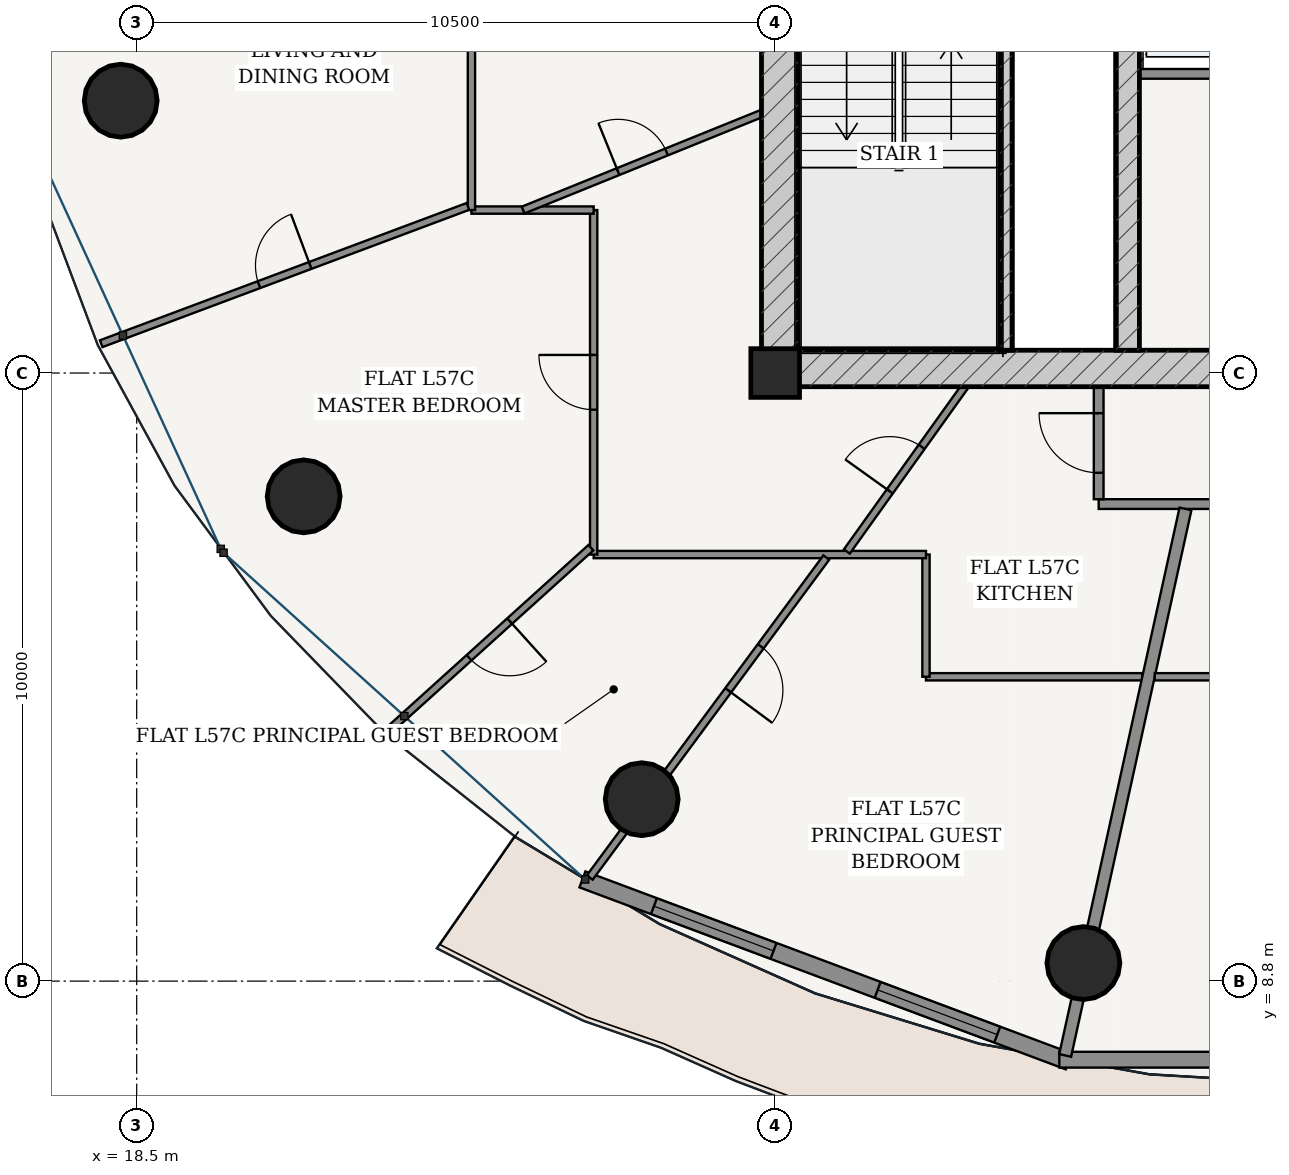
"""IFC4 building model, lengths in metres.
Left out: names, types, materials, properties, quantities, classifications, styles, units other than length and angle.
Written with IfcOpenShell. Run it as: python <this file> out.ifc"""

import sys

from ifc_helpers import new_model, si_unit, direction, frame, frame_2d, origin, origin_2d, place, context, subcontext, project, spatial, rectangle, hollow_circle, extrude, source, transform, mapped, element, fill, save


model = new_model("IFC4")
c1 = context("Model", 3, precision=1e-05, world=origin(), true_north=direction((-0.2419218956, 0.970295726276)))
c2 = subcontext(c1, "Body", "Model", "MODEL_VIEW")
j1 = project(units=[si_unit("LENGTHUNIT", "METRE"), si_unit("PLANEANGLEUNIT", "RADIAN")], contexts=[c1])
p1 = place(None, origin())
s1 = spatial("IfcSite", under=j1, at=p1, CompositionType="ELEMENT")
p2 = place(p1, origin())
s2 = spatial("IfcBuilding", under=s1, at=p2, CompositionType="ELEMENT")
p3 = place(p2, frame((0.0, 0.0, 217.1)))
s3 = spatial("IfcBuildingStorey", under=s2, at=p3, CompositionType="ELEMENT", Elevation=217.1)
p4 = place(p3, frame((29.0, 18.8, 0.0), z_axis=(0.0, 0.0, 1.0), x_axis=(1.0, 0.0, 0.0)))
e1 = element("IfcColumn", 1, at=p4, inside=s3, PredefinedType="COLUMN", context=c2, shape_type="SweptSolid", body=[
    extrude(rectangle(XDim=0.8, YDim=0.8, at=origin_2d()), origin(), (0.0, 0.0, 1.0), 3.7),
])
p5 = place(p3, frame((28.775, 18.875, 0.0), z_axis=(0.0, 0.0, 1.0), x_axis=(1.0, 0.0, 0.0)))
e2 = element("IfcWall", 2, at=p5, inside=s3, PredefinedType="SHEAR", context=c2, shape_type="SweptSolid", body=[
    extrude(rectangle(XDim=18.45, YDim=0.6, at=frame_2d((9.225, 0.0))), origin(), (0.0, 0.0, 1.0), 3.435),
])
p6 = place(p5, frame((7.46, 0.0, 0.0)))
e3 = element("IfcOpeningElement", 3, at=p6, cuts=e2, PredefinedType="OPENING", context=c2, shape_type="SweptSolid", body=[
    extrude(rectangle(XDim=0.85, YDim=2.1, at=frame_2d((0.425, 1.05))), frame((0.0, 0.31, 0.0), z_axis=(0.0, -1.0, 0.0), x_axis=(1.0, 0.0, 0.0)), (0.0, 0.0, 1.0), 0.62),
])
p7 = place(p5, frame((10.54, 0.0, 0.0)))
e4 = element("IfcOpeningElement", 4, at=p7, cuts=e2, PredefinedType="OPENING", context=c2, shape_type="SweptSolid", body=[
    extrude(rectangle(XDim=0.85, YDim=2.1, at=frame_2d((0.425, 1.05))), frame((0.0, 0.31, 0.0), z_axis=(0.0, -1.0, 0.0), x_axis=(1.0, 0.0, 0.0)), (0.0, 0.0, 1.0), 0.62),
])
p8 = place(p3, frame((29.075, 19.175, 0.0), z_axis=(0.0, 0.0, 1.0), x_axis=(0.0, 1.0, 0.0)))
e5 = element("IfcWall", 5, at=p8, inside=s3, PredefinedType="SHEAR", context=c2, shape_type="SweptSolid", body=[
    extrude(rectangle(XDim=15.25, YDim=0.6, at=frame_2d((7.625, 0.0))), origin(), (0.0, 0.0, 1.0), 3.435),
])
p9 = place(p8, frame((9.875, 0.0, 0.0)))
e6 = element("IfcOpeningElement", 6, at=p9, cuts=e5, PredefinedType="OPENING", context=c2, shape_type="SweptSolid", body=[
    extrude(rectangle(XDim=1.5, YDim=2.2, at=frame_2d((0.75, 1.1))), frame((0.0, 0.31, 0.0), z_axis=(0.0, -1.0, 0.0), x_axis=(1.0, 0.0, 0.0)), (0.0, 0.0, 1.0), 0.62),
])
p10 = place(p3, frame((32.795, 19.175, 0.0), z_axis=(0.0, 0.0, 1.0), x_axis=(0.0, 1.0, 0.0)))
e7 = element("IfcWall", 7, at=p10, inside=s3, PredefinedType="SOLIDWALL", context=c2, shape_type="SweptSolid", body=[
    extrude(rectangle(XDim=7.375, YDim=0.2, at=frame_2d((3.688, 0.0))), origin(), (0.0, 0.0, 1.0), 3.435),
])
p11 = place(p3, frame((34.8, 19.175, 0.0), z_axis=(0.0, 0.0, 1.0), x_axis=(0.0, 1.0, 0.0)))
e8 = element("IfcWall", 8, at=p11, inside=s3, PredefinedType="SHEAR", context=c2, shape_type="SweptSolid", body=[
    extrude(rectangle(XDim=15.25, YDim=0.38, at=frame_2d((7.625, 0.0))), origin(), (0.0, 0.0, 1.0), 3.435),
])
p12 = place(p11, frame((7.8, 0.0, 0.0)))
e9 = element("IfcOpeningElement", 9, at=p12, cuts=e8, PredefinedType="OPENING", context=c2, shape_type="SweptSolid", body=[
    extrude(rectangle(XDim=1.05, YDim=2.15, at=frame_2d((0.525, 1.075))), frame((0.0, 0.2, 0.0), z_axis=(0.0, -1.0, 0.0), x_axis=(1.0, 0.0, 0.0)), (0.0, 0.0, 1.0), 0.4),
])
for number, where, z_axis, x_axis in (
    (10, (18.237, 23.279, 0.0), (0.0, 0.0, 1.0), (1.0, 0.0, 0.0)),
    (11, (21.246, 16.772, 0.0), (0.0, 0.0, 1.0), (1.0, 0.0, 0.0)),
    (12, (26.805, 11.792, 0.0), (0.0, 0.0, 1.0), (1.0, 0.0, 0.0)),
    (13, (34.069, 9.097, 0.0), (0.0, 0.0, 1.0), (1.0, 0.0, 0.0)),
):
    element("IfcColumn", number, at=place(p3, frame(where, z_axis=z_axis, x_axis=x_axis)), inside=s3, PredefinedType="COLUMN", context=c2, shape_type="SweptSolid", body=[
        extrude(hollow_circle(Radius=0.6, WallThickness=0.038, at=origin_2d()), origin(), (0.0, 0.0, 1.0), 3.7),
    ])
p13 = place(p3, frame((25.83, 10.473, 0.0), z_axis=(0.0, 0.0, 1.0), x_axis=(0.936556918375, -0.350515532672, 0.0)))
e14 = element("IfcWall", 14, at=p13, inside=s3, PredefinedType="SOLIDWALL", context=c2, shape_type="SweptSolid", body=[
    extrude(rectangle(XDim=8.539, YDim=0.28, at=frame_2d((4.27, 0.0))), origin(), (0.0, 0.0, 1.0), 3.435),
])
p14 = place(p13, frame((1.256, 0.0, 0.85)))
e15 = element("IfcOpeningElement", 15, at=p14, cuts=e14, PredefinedType="OPENING", context=c2, shape_type="SweptSolid", body=[
    extrude(rectangle(XDim=2.1, YDim=1.95, at=frame_2d((1.05, 0.975))), frame((0.0, 0.15, 0.0), z_axis=(0.0, -1.0, 0.0), x_axis=(1.0, 0.0, 0.0)), (0.0, 0.0, 1.0), 0.3),
])
p15 = place(p13, frame((5.184, 0.0, 0.85)))
e16 = element("IfcOpeningElement", 16, at=p15, cuts=e14, PredefinedType="OPENING", context=c2, shape_type="SweptSolid", body=[
    extrude(rectangle(XDim=2.1, YDim=1.95, at=frame_2d((1.05, 0.975))), frame((0.0, 0.15, 0.0), z_axis=(0.0, -1.0, 0.0), x_axis=(1.0, 0.0, 0.0)), (0.0, 0.0, 1.0), 0.3),
])
p16 = place(p3, frame((33.673, 7.508, 0.0), z_axis=(0.0, 0.0, 1.0), x_axis=(1.0, 0.0, 0.0)))
e17 = element("IfcWall", 17, at=p16, inside=s3, PredefinedType="SOLIDWALL", context=c2, shape_type="SweptSolid", body=[
    extrude(rectangle(XDim=8.654, YDim=0.26, at=frame_2d((4.327, 0.0))), origin(), (0.0, 0.0, 1.0), 3.435),
])
p17 = place(p16, frame((3.652, 0.0, 0.0)))
e18 = element("IfcOpeningElement", 18, at=p17, cuts=e17, PredefinedType="OPENING", context=c2, shape_type="SweptSolid", body=[
    extrude(rectangle(XDim=1.35, YDim=2.2, at=frame_2d((0.675, 1.1))), frame((0.0, 0.14, 0.0), z_axis=(0.0, -1.0, 0.0), x_axis=(1.0, 0.0, 0.0)), (0.0, 0.0, 1.0), 0.28),
])
p18 = place(p3, frame((34.99, 23.72, 0.0), z_axis=(0.0, 0.0, 1.0), x_axis=(1.0, 0.0, 0.0)))
e19 = element("IfcWall", 19, at=p18, inside=s3, PredefinedType="PARTITIONING", context=c2, shape_type="SweptSolid", body=[
    extrude(rectangle(XDim=6.02, YDim=0.16, at=frame_2d((3.01, 0.0))), origin(), (0.0, 0.0, 1.0), 3.435),
])
p19 = place(p3, frame((34.32, 16.645, 0.0), z_axis=(0.0, 0.0, 1.0), x_axis=(1.0, 0.0, 0.0)))
e20 = element("IfcWall", 20, at=p19, inside=s3, PredefinedType="PARTITIONING", context=c2, shape_type="SweptSolid", body=[
    extrude(rectangle(XDim=14.835, YDim=0.16, at=frame_2d((7.417, 0.0))), origin(), (0.0, 0.0, 1.0), 2.951),
])
p20 = place(p19, frame((8.973, 0.0, 0.0)))
e21 = element("IfcOpeningElement", 21, at=p20, cuts=e20, PredefinedType="OPENING", context=c2, shape_type="SweptSolid", body=[
    extrude(rectangle(XDim=0.98, YDim=2.2, at=frame_2d((0.49, 1.1))), frame((0.0, 0.09, 0.0), z_axis=(0.0, -1.0, 0.0), x_axis=(1.0, 0.0, 0.0)), (0.0, 0.0, 1.0), 0.18),
])
p21 = place(p3, frame((34.32, 16.725, 0.0), z_axis=(0.0, 0.0, 1.0), x_axis=(0.0, 1.0, 0.0)))
e22 = element("IfcWall", 22, at=p21, inside=s3, PredefinedType="PARTITIONING", context=c2, shape_type="SweptSolid", body=[
    extrude(rectangle(XDim=1.85, YDim=0.16, at=frame_2d((0.925, 0.0))), origin(), (0.0, 0.0, 1.0), 3.435),
])
p22 = place(p21, frame((0.435, 0.0, 0.0)))
e23 = element("IfcOpeningElement", 23, at=p22, cuts=e22, PredefinedType="OPENING", context=c2, shape_type="SweptSolid", body=[
    extrude(rectangle(XDim=0.98, YDim=2.2, at=frame_2d((0.49, 1.1))), frame((0.0, 0.09, 0.0), z_axis=(0.0, -1.0, 0.0), x_axis=(1.0, 0.0, 0.0)), (0.0, 0.0, 1.0), 0.18),
])
p23 = place(p3, frame((35.038, 13.805, 0.0), z_axis=(0.0, 0.0, 1.0), x_axis=(-1.0, 0.0, 0.0)))
e24 = element("IfcWall", 24, at=p23, inside=s3, PredefinedType="PARTITIONING", context=c2, shape_type="SweptSolid", body=[
    extrude(rectangle(XDim=3.558, YDim=0.12, at=frame_2d((1.779, 0.0))), origin(), (0.0, 0.0, 1.0), 2.951),
])
p24 = place(p3, frame((31.48, 13.805, 0.0), z_axis=(0.0, 0.0, 1.0), x_axis=(0.0, 1.0, 0.0)))
e25 = element("IfcWall", 25, at=p24, inside=s3, PredefinedType="PARTITIONING", context=c2, shape_type="SweptSolid", body=[
    extrude(rectangle(XDim=2.01, YDim=0.12, at=frame_2d((1.005, 0.0))), origin(), (0.0, 0.0, 1.0), 3.11),
])
p25 = place(p3, frame((31.48, 15.815, 0.0), z_axis=(0.0, 0.0, 1.0), x_axis=(-1.0, 0.0, 0.0)))
e26 = element("IfcWall", 26, at=p25, inside=s3, PredefinedType="PARTITIONING", context=c2, shape_type="SweptSolid", body=[
    extrude(rectangle(XDim=5.465, YDim=0.12, at=frame_2d((2.732, 0.0))), origin(), (0.0, 0.0, 1.0), 2.951),
])
p26 = place(p3, frame((26.015, 15.815, 0.0), z_axis=(0.0, 0.0, 1.0), x_axis=(0.0, 1.0, 0.0)))
e27 = element("IfcWall", 27, at=p26, inside=s3, PredefinedType="PARTITIONING", context=c2, shape_type="SweptSolid", body=[
    extrude(rectangle(XDim=5.665, YDim=0.12, at=frame_2d((2.833, 0.0))), origin(), (0.0, 0.0, 1.0), 2.951),
])
p27 = place(p26, frame((2.383, 0.0, 0.0)))
e28 = element("IfcOpeningElement", 28, at=p27, cuts=e27, PredefinedType="OPENING", context=c2, shape_type="SweptSolid", body=[
    extrude(rectangle(XDim=0.9, YDim=2.15, at=frame_2d((0.45, 1.075))), frame((0.0, 0.07, 0.0), z_axis=(0.0, -1.0, 0.0), x_axis=(1.0, 0.0, 0.0)), (0.0, 0.0, 1.0), 0.14),
])
p28 = place(p3, frame((26.015, 21.48, 0.0), z_axis=(0.0, 0.0, 1.0), x_axis=(-1.0, 0.0, 0.0)))
e29 = element("IfcWall", 29, at=p28, inside=s3, PredefinedType="PARTITIONING", context=c2, shape_type="SweptSolid", body=[
    extrude(rectangle(XDim=2.01, YDim=0.12, at=frame_2d((1.005, 0.0))), origin(), (0.0, 0.0, 1.0), 3.11),
])
p29 = place(p3, frame((24.005, 21.48, 0.0), z_axis=(0.0, 0.0, 1.0), x_axis=(0.0, 1.0, 0.0)))
e30 = element("IfcWall", 30, at=p29, inside=s3, PredefinedType="PARTITIONING", context=c2, shape_type="SweptSolid", body=[
    extrude(rectangle(XDim=5.218, YDim=0.12, at=frame_2d((2.609, 0.0))), origin(), (0.0, 0.0, 1.0), 2.951),
])
p30 = place(p3, frame((23.947, 21.54, 0.0), z_axis=(0.0, 0.0, 1.0), x_axis=(-0.936534700322, -0.350574892274, 0.0)))
e31 = element("IfcWall", 31, at=p30, inside=s3, PredefinedType="PARTITIONING", context=c2, shape_type="SweptSolid", body=[
    extrude(rectangle(XDim=6.439, YDim=0.12, at=frame_2d((3.219, 0.0))), origin(), (0.0, 0.0, 1.0), 2.951),
])
p31 = place(p30, frame((2.769, 0.0, 0.0)))
e32 = element("IfcOpeningElement", 32, at=p31, cuts=e31, PredefinedType="OPENING", context=c2, shape_type="SweptSolid", body=[
    extrude(rectangle(XDim=0.9, YDim=2.15, at=frame_2d((0.45, 1.075))), frame((0.0, 0.07, 0.0), z_axis=(0.0, -1.0, 0.0), x_axis=(1.0, 0.0, 0.0)), (0.0, 0.0, 1.0), 0.14),
])
p32 = place(p3, frame((25.969, 15.928, 0.0), z_axis=(0.0, 0.0, 1.0), x_axis=(-0.741935446671, -0.670471321514, 0.0)))
e33 = element("IfcWall", 33, at=p32, inside=s3, PredefinedType="PARTITIONING", context=c2, shape_type="SweptSolid", body=[
    extrude(rectangle(XDim=4.499, YDim=0.12, at=frame_2d((2.25, 0.0))), origin(), (0.0, 0.0, 1.0), 2.951),
])
p33 = place(p32, frame((1.8, 0.0, 0.0)))
e34 = element("IfcOpeningElement", 34, at=p33, cuts=e33, PredefinedType="OPENING", context=c2, shape_type="SweptSolid", body=[
    extrude(rectangle(XDim=0.9, YDim=2.15, at=frame_2d((0.45, 1.075))), frame((0.0, 0.07, 0.0), z_axis=(0.0, -1.0, 0.0), x_axis=(1.0, 0.0, 0.0)), (0.0, 0.0, 1.0), 0.14),
])
p34 = place(p3, frame((29.841, 15.765, 0.0), z_axis=(0.0, 0.0, 1.0), x_axis=(-0.594535821787, -0.804069124275, 0.0)))
e35 = element("IfcWall", 35, at=p34, inside=s3, PredefinedType="PARTITIONING", context=c2, shape_type="SweptSolid", body=[
    extrude(rectangle(XDim=6.543, YDim=0.12, at=frame_2d((3.272, 0.0))), origin(), (0.0, 0.0, 1.0), 2.951),
])
p35 = place(p34, frame((1.814, 0.0, 0.0)))
e36 = element("IfcOpeningElement", 36, at=p35, cuts=e35, PredefinedType="OPENING", context=c2, shape_type="SweptSolid", body=[
    extrude(rectangle(XDim=0.9, YDim=2.15, at=frame_2d((0.45, 1.075))), frame((0.0, 0.07, 0.0), z_axis=(0.0, -1.0, 0.0), x_axis=(1.0, 0.0, 0.0)), (0.0, 0.0, 1.0), 0.14),
])
p36 = place(p3, frame((28.775, 23.067, 0.0), z_axis=(0.0, 0.0, 1.0), x_axis=(-0.926976443277, -0.375119545757, 0.0)))
e37 = element("IfcWall", 37, at=p36, inside=s3, PredefinedType="PARTITIONING", context=c2, shape_type="SweptSolid", body=[
    extrude(rectangle(XDim=4.23, YDim=0.12, at=frame_2d((2.115, 0.0))), origin(), (0.0, 0.0, 1.0), 3.435),
])
p37 = place(p36, frame((1.685, 0.0, 0.0)))
e38 = element("IfcOpeningElement", 38, at=p37, cuts=e37, PredefinedType="OPENING", context=c2, shape_type="SweptSolid", body=[
    extrude(rectangle(XDim=0.86, YDim=2.15, at=frame_2d((0.43, 1.075))), frame((0.0, 0.07, 0.0), z_axis=(0.0, -1.0, 0.0), x_axis=(1.0, 0.0, 0.0)), (0.0, 0.0, 1.0), 0.14),
])
p38 = place(p3, frame((32.117, 18.575, 0.0), z_axis=(0.0, 0.0, 1.0), x_axis=(-0.581813438478, -0.813322274874, 0.0)))
e39 = element("IfcWall", 39, at=p38, inside=s3, PredefinedType="PARTITIONING", context=c2, shape_type="SweptSolid", body=[
    extrude(rectangle(XDim=3.331, YDim=0.12, at=frame_2d((1.666, 0.0))), origin(), (0.0, 0.0, 1.0), 3.435),
])
p39 = place(p38, frame((1.216, 0.0, 0.0)))
e40 = element("IfcOpeningElement", 40, at=p39, cuts=e39, PredefinedType="OPENING", context=c2, shape_type="SweptSolid", body=[
    extrude(rectangle(XDim=0.9, YDim=2.15, at=frame_2d((0.45, 1.075))), frame((0.0, 0.07, 0.0), z_axis=(0.0, -1.0, 0.0), x_axis=(1.0, 0.0, 0.0)), (0.0, 0.0, 1.0), 0.14),
])
p40 = place(p3, frame((35.747, 16.565, 0.0), z_axis=(0.0, 0.0, 1.0), x_axis=(-0.214957946814, -0.976623305631, 0.0)))
e41 = element("IfcWall", 41, at=p40, inside=s3, PredefinedType="PARTITIONING", context=c2, shape_type="SweptSolid", body=[
    extrude(rectangle(XDim=9.202, YDim=0.2, at=frame_2d((4.601, 0.0))), origin(), (0.0, 0.0, 1.0), 2.951),
])
p41 = place(p3, frame((51.995, 13.805, 0.0), z_axis=(0.0, 0.0, 1.0), x_axis=(-1.0, 0.0, 0.0)))
e42 = element("IfcWall", 42, at=p41, inside=s3, PredefinedType="PARTITIONING", context=c2, shape_type="SweptSolid", body=[
    extrude(rectangle(XDim=16.753, YDim=0.12, at=frame_2d((8.377, 0.0))), origin(), (0.0, 0.0, 1.0), 2.951),
])
p42 = place(p41, frame((7.442, 0.0, 0.0)))
e43 = element("IfcOpeningElement", 43, at=p42, cuts=e42, PredefinedType="OPENING", context=c2, shape_type="SweptSolid", body=[
    extrude(rectangle(XDim=0.9, YDim=2.15, at=frame_2d((0.45, 1.075))), frame((0.0, 0.07, 0.0), z_axis=(0.0, -1.0, 0.0), x_axis=(1.0, 0.0, 0.0)), (0.0, 0.0, 1.0), 0.14),
])
m1 = source(origin(), c2, "Body", "SweptSolid", [
    extrude(rectangle(XDim=2.1, YDim=1.95, at=frame_2d((1.05, 0.975))), frame((0.0, 0.03, 0.0), z_axis=(0.0, -1.0, 0.0), x_axis=(1.0, 0.0, 0.0)), (0.0, 0.0, 1.0), 0.06),
])
p43 = place(p14, origin())
e44 = element("IfcWindow", 44, at=p43, inside=s3, PartitioningType="SINGLE_PANEL", PredefinedType="WINDOW", context=c2, shape_type="MappedRepresentation", body=[
    mapped(m1, transform((0.0, 0.0, 0.0), scale=1.0)),
])
fill(e15, e44)
p44 = place(p15, origin())
e45 = element("IfcWindow", 45, at=p44, inside=s3, PartitioningType="SINGLE_PANEL", PredefinedType="WINDOW", context=c2, shape_type="MappedRepresentation", body=[
    mapped(m1, transform((0.0, 0.0, 0.0), scale=1.0)),
])
fill(e16, e45)
m2 = source(origin(), c2, "Body", "SweptSolid", [
    extrude(rectangle(XDim=0.98, YDim=2.2, at=frame_2d((0.49, 1.1))), frame((0.0, 0.025, 0.0), z_axis=(0.0, -1.0, 0.0), x_axis=(1.0, 0.0, 0.0)), (0.0, 0.0, 1.0), 0.05),
])
p45 = place(p22, origin())
e46 = element("IfcDoor", 46, at=p45, inside=s3, OperationType="SINGLE_SWING_RIGHT", PredefinedType="DOOR", context=c2, shape_type="MappedRepresentation", body=[
    mapped(m2, transform((0.0, 0.0, 0.0), scale=1.0)),
])
fill(e23, e46)
m3 = source(origin(), c2, "Body", "SweptSolid", [
    extrude(rectangle(XDim=0.9, YDim=2.15, at=frame_2d((0.45, 1.075))), frame((0.0, 0.025, 0.0), z_axis=(0.0, -1.0, 0.0), x_axis=(1.0, 0.0, 0.0)), (0.0, 0.0, 1.0), 0.05),
])
p46 = place(p39, frame((0.9, 0.0, 0.0), z_axis=(0.0, 0.0, 1.0), x_axis=(-1.0, 0.0, 0.0)))
e47 = element("IfcDoor", 47, at=p46, inside=s3, OperationType="SINGLE_SWING_LEFT", PredefinedType="DOOR", context=c2, shape_type="MappedRepresentation", body=[
    mapped(m3, transform((0.0, 0.0, 0.0), scale=1.0)),
])
fill(e40, e47)
p47 = place(p27, origin())
e48 = element("IfcDoor", 48, at=p47, inside=s3, OperationType="SINGLE_SWING_RIGHT", PredefinedType="DOOR", context=c2, shape_type="MappedRepresentation", body=[
    mapped(m3, transform((0.0, 0.0, 0.0), scale=1.0)),
])
fill(e28, e48)
p48 = place(p33, origin())
e49 = element("IfcDoor", 49, at=p48, inside=s3, OperationType="SINGLE_SWING_LEFT", PredefinedType="DOOR", context=c2, shape_type="MappedRepresentation", body=[
    mapped(m3, transform((0.0, 0.0, 0.0), scale=1.0)),
])
fill(e34, e49)
p49 = place(p35, origin())
e50 = element("IfcDoor", 50, at=p49, inside=s3, OperationType="SINGLE_SWING_RIGHT", PredefinedType="DOOR", context=c2, shape_type="MappedRepresentation", body=[
    mapped(m3, transform((0.0, 0.0, 0.0), scale=1.0)),
])
fill(e36, e50)
m4 = source(origin(), c2, "Body", "SweptSolid", [
    extrude(rectangle(XDim=0.86, YDim=2.15, at=frame_2d((0.43, 1.075))), frame((0.0, 0.025, 0.0), z_axis=(0.0, -1.0, 0.0), x_axis=(1.0, 0.0, 0.0)), (0.0, 0.0, 1.0), 0.05),
])
p50 = place(p37, frame((0.86, 0.0, 0.0), z_axis=(0.0, 0.0, 1.0), x_axis=(-1.0, 0.0, 0.0)))
e51 = element("IfcDoor", 51, at=p50, inside=s3, OperationType="SINGLE_SWING_LEFT", PredefinedType="DOOR", context=c2, shape_type="MappedRepresentation", body=[
    mapped(m4, transform((0.0, 0.0, 0.0), scale=1.0)),
])
fill(e38, e51)
p51 = place(p31, frame((0.9, 0.0, 0.0), z_axis=(0.0, 0.0, 1.0), x_axis=(-1.0, 0.0, 0.0)))
e52 = element("IfcDoor", 52, at=p51, inside=s3, OperationType="SINGLE_SWING_RIGHT", PredefinedType="DOOR", context=c2, shape_type="MappedRepresentation", body=[
    mapped(m3, transform((0.0, 0.0, 0.0), scale=1.0)),
])
fill(e32, e52)
save(model, sys.argv[1])
